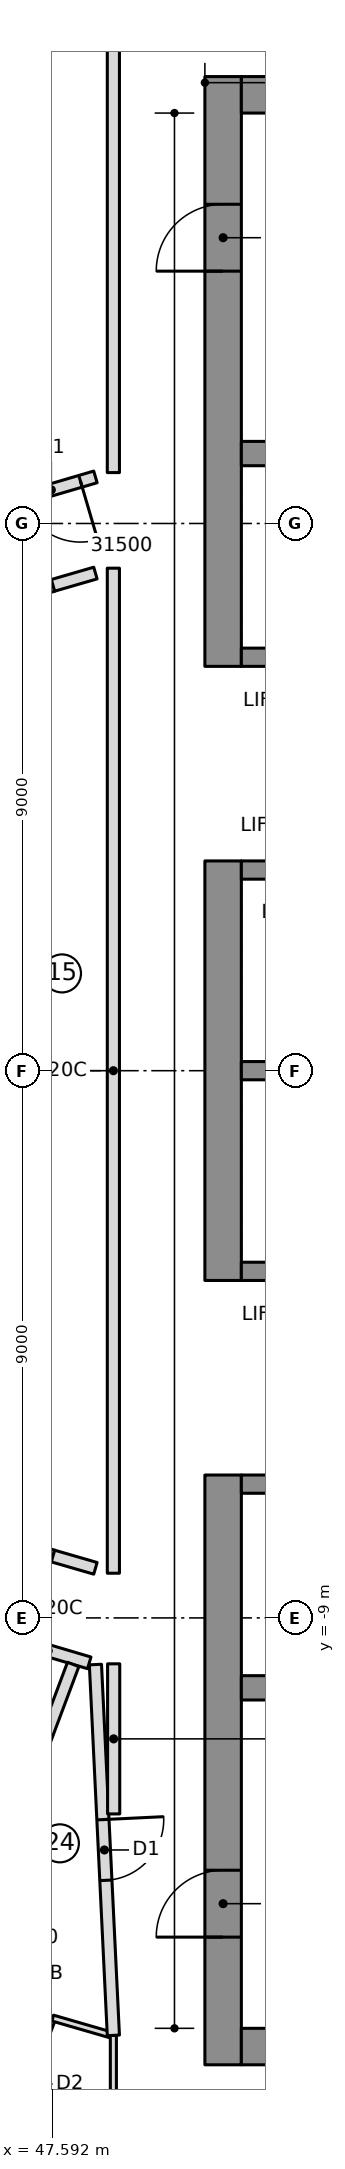
"""IFC4 building model, lengths in metres.
Left out: names, types, materials, properties, quantities, classifications, styles, units other than length and angle.
Written with IfcOpenShell. Run it as: python <this file> out.ifc"""

import sys

from ifc_helpers import new_model, si_unit, direction, frame, frame_2d, origin, place, context, subcontext, project, spatial, rectangle, extrude, element, fill, save


model = new_model("IFC4")
c1 = context("Model", 3, precision=1e-05, world=origin(), true_north=direction((0.0, 1.0)))
c2 = subcontext(c1, "Body", "Model", "MODEL_VIEW")
j1 = project(units=[si_unit("LENGTHUNIT", "METRE"), si_unit("PLANEANGLEUNIT", "RADIAN")], contexts=[c1])
p1 = place(None, origin())
s1 = spatial("IfcSite", under=j1, at=p1, CompositionType="ELEMENT")
p2 = place(p1, origin())
s2 = spatial("IfcBuilding", under=s1, at=p2, CompositionType="ELEMENT")
p3 = place(p2, frame((0.0, 0.0, 252.75)))
s3 = spatial("IfcBuildingStorey", under=s2, at=p3, CompositionType="ELEMENT", Elevation=252.75)
p4 = place(p3, frame((50.4, 6.65, 0.0), z_axis=(0.0, 0.0, 1.0), x_axis=(0.0, 1.0, 0.0)))
e1 = element("IfcWall", 1, at=p4, inside=s3, PredefinedType="SHEAR", context=c2, shape_type="SweptSolid", body=[
    extrude(rectangle(XDim=9.7, YDim=0.6, at=frame_2d((4.85, 0.0))), origin(), (0.0, 0.0, 1.0), 3.55),
])
p5 = place(p4, frame((6.5, 0.0, 0.0)))
e2 = element("IfcOpeningElement", 2, at=p5, cuts=e1, PredefinedType="OPENING", context=c2, shape_type="SweptSolid", body=[
    extrude(rectangle(XDim=1.1, YDim=2.1, at=frame_2d((0.55, 1.05))), frame((0.0, 0.31, 0.0), z_axis=(0.0, -1.0, 0.0), x_axis=(1.0, 0.0, 0.0)), (0.0, 0.0, 1.0), 0.62),
])
p6 = place(p3, frame((50.4, -3.45, 0.0), z_axis=(0.0, 0.0, 1.0), x_axis=(0.0, 1.0, 0.0)))
e3 = element("IfcWall", 3, at=p6, inside=s3, PredefinedType="SHEAR", context=c2, shape_type="SweptSolid", body=[
    extrude(rectangle(XDim=6.9, YDim=0.6, at=frame_2d((3.45, 0.0))), origin(), (0.0, 0.0, 1.0), 3.55),
])
p7 = place(p3, frame((50.4, -16.35, 0.0), z_axis=(0.0, 0.0, 1.0), x_axis=(0.0, 1.0, 0.0)))
e4 = element("IfcWall", 4, at=p7, inside=s3, PredefinedType="SHEAR", context=c2, shape_type="SweptSolid", body=[
    extrude(rectangle(XDim=9.7, YDim=0.6, at=frame_2d((4.85, 0.0))), origin(), (0.0, 0.0, 1.0), 3.55),
])
p8 = place(p7, frame((2.1, 0.0, 0.0)))
e5 = element("IfcOpeningElement", 5, at=p8, cuts=e4, PredefinedType="OPENING", context=c2, shape_type="SweptSolid", body=[
    extrude(rectangle(XDim=1.1, YDim=2.1, at=frame_2d((0.55, 1.05))), frame((0.0, 0.31, 0.0), z_axis=(0.0, -1.0, 0.0), x_axis=(1.0, 0.0, 0.0)), (0.0, 0.0, 1.0), 0.62),
])
for number, where, z_axis, x_axis in (
    (6, (50.7, 16.05, 0.0), (0.0, 0.0, 1.0), (1.0, 0.0, 0.0)),
    (7, (50.7, -16.05, 0.0), (0.0, 0.0, 1.0), (1.0, 0.0, 0.0)),
):
    element("IfcWall", number, at=place(p3, frame(where, z_axis=z_axis, x_axis=x_axis)), inside=s3, PredefinedType="SHEAR", context=c2, shape_type="SweptSolid", body=[
        extrude(rectangle(XDim=13.62, YDim=0.6, at=frame_2d((6.81, 0.0))), origin(), (0.0, 0.0, 1.0), 3.55),
    ])
p9 = place(p3, frame((50.7, 10.15, 0.0), z_axis=(0.0, 0.0, 1.0), x_axis=(1.0, 0.0, 0.0)))
e8 = element("IfcWall", 8, at=p9, inside=s3, PredefinedType="SHEAR", context=c2, shape_type="SweptSolid", body=[
    extrude(rectangle(XDim=13.02, YDim=0.4, at=frame_2d((6.51, 0.0))), origin(), (0.0, 0.0, 1.0), 3.55),
])
p10 = place(p9, frame((0.7, 0.0, 0.0)))
e9 = element("IfcOpeningElement", 9, at=p10, cuts=e8, PredefinedType="OPENING", context=c2, shape_type="SweptSolid", body=[
    extrude(rectangle(XDim=1.1, YDim=2.1, at=frame_2d((0.55, 1.05))), frame((0.0, 0.21, 0.0), z_axis=(0.0, -1.0, 0.0), x_axis=(1.0, 0.0, 0.0)), (0.0, 0.0, 1.0), 0.42),
])
p11 = place(p9, frame((3.5, 0.0, 0.0)))
e10 = element("IfcOpeningElement", 10, at=p11, cuts=e8, PredefinedType="OPENING", context=c2, shape_type="SweptSolid", body=[
    extrude(rectangle(XDim=1.1, YDim=2.1, at=frame_2d((0.55, 1.05))), frame((0.0, 0.21, 0.0), z_axis=(0.0, -1.0, 0.0), x_axis=(1.0, 0.0, 0.0)), (0.0, 0.0, 1.0), 0.42),
])
p12 = place(p3, frame((50.7, -10.15, 0.0), z_axis=(0.0, 0.0, 1.0), x_axis=(1.0, 0.0, 0.0)))
e11 = element("IfcWall", 11, at=p12, inside=s3, PredefinedType="SHEAR", context=c2, shape_type="SweptSolid", body=[
    extrude(rectangle(XDim=13.02, YDim=0.4, at=frame_2d((6.51, 0.0))), origin(), (0.0, 0.0, 1.0), 3.55),
])
p13 = place(p3, frame((50.7, 0.0, 0.0), z_axis=(0.0, 0.0, 1.0), x_axis=(1.0, 0.0, 0.0)))
e12 = element("IfcWall", 12, at=p13, inside=s3, PredefinedType="SHEAR", context=c2, shape_type="SweptSolid", body=[
    extrude(rectangle(XDim=10.9, YDim=0.3, at=frame_2d((5.45, 0.0))), origin(), (0.0, 0.0, 1.0), 3.55),
])
p14 = place(p3, frame((50.7, 3.3, 0.0), z_axis=(0.0, 0.0, 1.0), x_axis=(1.0, 0.0, 0.0)))
e13 = element("IfcWall", 13, at=p14, inside=s3, PredefinedType="SHEAR", context=c2, shape_type="SweptSolid", body=[
    extrude(rectangle(XDim=10.9, YDim=0.3, at=frame_2d((5.45, 0.0))), origin(), (0.0, 0.0, 1.0), 3.55),
])
p15 = place(p14, frame((0.7, 0.0, 0.0)))
e14 = element("IfcOpeningElement", 14, at=p15, cuts=e13, PredefinedType="OPENING", context=c2, shape_type="SweptSolid", body=[
    extrude(rectangle(XDim=1.1, YDim=2.1, at=frame_2d((0.55, 1.05))), frame((0.0, 0.16, 0.0), z_axis=(0.0, -1.0, 0.0), x_axis=(1.0, 0.0, 0.0)), (0.0, 0.0, 1.0), 0.32),
])
p16 = place(p14, frame((3.5, 0.0, 0.0)))
e15 = element("IfcOpeningElement", 15, at=p16, cuts=e13, PredefinedType="OPENING", context=c2, shape_type="SweptSolid", body=[
    extrude(rectangle(XDim=1.1, YDim=2.1, at=frame_2d((0.55, 1.05))), frame((0.0, 0.16, 0.0), z_axis=(0.0, -1.0, 0.0), x_axis=(1.0, 0.0, 0.0)), (0.0, 0.0, 1.0), 0.32),
])
p17 = place(p14, frame((6.4, 0.0, 0.0)))
e16 = element("IfcOpeningElement", 16, at=p17, cuts=e13, PredefinedType="OPENING", context=c2, shape_type="SweptSolid", body=[
    extrude(rectangle(XDim=0.9, YDim=2.1, at=frame_2d((0.45, 1.05))), frame((0.0, 0.16, 0.0), z_axis=(0.0, -1.0, 0.0), x_axis=(1.0, 0.0, 0.0)), (0.0, 0.0, 1.0), 0.32),
])
p18 = place(p14, frame((9.2, 0.0, 0.0)))
e17 = element("IfcOpeningElement", 17, at=p18, cuts=e13, PredefinedType="OPENING", context=c2, shape_type="SweptSolid", body=[
    extrude(rectangle(XDim=0.9, YDim=2.1, at=frame_2d((0.45, 1.05))), frame((0.0, 0.16, 0.0), z_axis=(0.0, -1.0, 0.0), x_axis=(1.0, 0.0, 0.0)), (0.0, 0.0, 1.0), 0.32),
])
p19 = place(p3, frame((50.7, 6.8, 0.0), z_axis=(0.0, 0.0, 1.0), x_axis=(1.0, 0.0, 0.0)))
e18 = element("IfcWall", 18, at=p19, inside=s3, PredefinedType="SHEAR", context=c2, shape_type="SweptSolid", body=[
    extrude(rectangle(XDim=10.9, YDim=0.3, at=frame_2d((5.45, 0.0))), origin(), (0.0, 0.0, 1.0), 3.55),
])
p20 = place(p19, frame((6.4, 0.0, 0.0)))
e19 = element("IfcOpeningElement", 19, at=p20, cuts=e18, PredefinedType="OPENING", context=c2, shape_type="SweptSolid", body=[
    extrude(rectangle(XDim=0.9, YDim=2.1, at=frame_2d((0.45, 1.05))), frame((0.0, 0.16, 0.0), z_axis=(0.0, -1.0, 0.0), x_axis=(1.0, 0.0, 0.0)), (0.0, 0.0, 1.0), 0.32),
])
p21 = place(p19, frame((9.2, 0.0, 0.0)))
e20 = element("IfcOpeningElement", 20, at=p21, cuts=e18, PredefinedType="OPENING", context=c2, shape_type="SweptSolid", body=[
    extrude(rectangle(XDim=0.9, YDim=2.1, at=frame_2d((0.45, 1.05))), frame((0.0, 0.16, 0.0), z_axis=(0.0, -1.0, 0.0), x_axis=(1.0, 0.0, 0.0)), (0.0, 0.0, 1.0), 0.32),
])
p22 = place(p3, frame((50.7, -3.3, 0.0), z_axis=(0.0, 0.0, 1.0), x_axis=(1.0, 0.0, 0.0)))
e21 = element("IfcWall", 21, at=p22, inside=s3, PredefinedType="SHEAR", context=c2, shape_type="SweptSolid", body=[
    extrude(rectangle(XDim=10.9, YDim=0.3, at=frame_2d((5.45, 0.0))), origin(), (0.0, 0.0, 1.0), 3.55),
])
p23 = place(p22, frame((9.1, 0.0, 0.0)))
e22 = element("IfcOpeningElement", 22, at=p23, cuts=e21, PredefinedType="OPENING", context=c2, shape_type="SweptSolid", body=[
    extrude(rectangle(XDim=1.1, YDim=2.1, at=frame_2d((0.55, 1.05))), frame((0.0, 0.16, 0.0), z_axis=(0.0, -1.0, 0.0), x_axis=(1.0, 0.0, 0.0)), (0.0, 0.0, 1.0), 0.32),
])
p24 = place(p3, frame((50.7, -6.8, 0.0), z_axis=(0.0, 0.0, 1.0), x_axis=(1.0, 0.0, 0.0)))
e23 = element("IfcWall", 23, at=p24, inside=s3, PredefinedType="SHEAR", context=c2, shape_type="SweptSolid", body=[
    extrude(rectangle(XDim=10.9, YDim=0.3, at=frame_2d((5.45, 0.0))), origin(), (0.0, 0.0, 1.0), 3.55),
])
p25 = place(p24, frame((6.3, 0.0, 0.0)))
e24 = element("IfcOpeningElement", 24, at=p25, cuts=e23, PredefinedType="OPENING", context=c2, shape_type="SweptSolid", body=[
    extrude(rectangle(XDim=1.1, YDim=2.1, at=frame_2d((0.55, 1.05))), frame((0.0, 0.16, 0.0), z_axis=(0.0, -1.0, 0.0), x_axis=(1.0, 0.0, 0.0)), (0.0, 0.0, 1.0), 0.32),
])
p26 = place(p24, frame((9.1, 0.0, 0.0)))
e25 = element("IfcOpeningElement", 25, at=p26, cuts=e23, PredefinedType="OPENING", context=c2, shape_type="SweptSolid", body=[
    extrude(rectangle(XDim=1.1, YDim=2.1, at=frame_2d((0.55, 1.05))), frame((0.0, 0.16, 0.0), z_axis=(0.0, -1.0, 0.0), x_axis=(1.0, 0.0, 0.0)), (0.0, 0.0, 1.0), 0.32),
])
p27 = place(p24, frame((0.8, 0.0, 0.0)))
e26 = element("IfcOpeningElement", 26, at=p27, cuts=e23, PredefinedType="OPENING", context=c2, shape_type="SweptSolid", body=[
    extrude(rectangle(XDim=0.9, YDim=2.1, at=frame_2d((0.45, 1.05))), frame((0.0, 0.16, 0.0), z_axis=(0.0, -1.0, 0.0), x_axis=(1.0, 0.0, 0.0)), (0.0, 0.0, 1.0), 0.32),
])
p28 = place(p24, frame((3.6, 0.0, 0.0)))
e27 = element("IfcOpeningElement", 27, at=p28, cuts=e23, PredefinedType="OPENING", context=c2, shape_type="SweptSolid", body=[
    extrude(rectangle(XDim=0.9, YDim=2.1, at=frame_2d((0.45, 1.05))), frame((0.0, 0.16, 0.0), z_axis=(0.0, -1.0, 0.0), x_axis=(1.0, 0.0, 0.0)), (0.0, 0.0, 1.0), 0.32),
])
p29 = place(p3, frame((46.85, -9.34, 0.0), z_axis=(0.0, 0.0, 1.0), x_axis=(0.958866391875, -0.283857785753, 0.0)))
e28 = element("IfcWall", 28, at=p29, inside=s3, PredefinedType="PARTITIONING", context=c2, shape_type="SweptSolid", body=[
    extrude(rectangle(XDim=1.406, YDim=0.2, at=frame_2d((0.703, 0.0))), origin(), (0.0, 0.0, 1.0), 3.15),
])
p30 = place(p3, frame((44.56, -18.762, 0.0), z_axis=(0.0, 0.0, 1.0), x_axis=(0.35112901071, 0.936327089129, 0.0)))
e29 = element("IfcWall", 29, at=p30, inside=s3, PredefinedType="PARTITIONING", context=c2, shape_type="SweptSolid", body=[
    extrude(rectangle(XDim=9.608, YDim=0.2, at=frame_2d((4.804, 0.0))), origin(), (0.0, 0.0, 1.0), 3.15),
])
p31 = place(p3, frame((46.788, -17.741, 0.0), z_axis=(0.0, 0.0, 1.0), x_axis=(0.351158236187, 0.936316128857, 0.0)))
e30 = element("IfcWall", 30, at=p31, inside=s3, PredefinedType="PARTITIONING", context=c2, shape_type="SweptSolid", body=[
    extrude(rectangle(XDim=2.307, YDim=0.1, at=frame_2d((1.153, 0.0))), origin(), (0.0, 0.0, 1.0), 3.15),
])
p32 = place(p31, frame((0.75, 0.0, 0.0)))
e31 = element("IfcOpeningElement", 31, at=p32, cuts=e30, PredefinedType="OPENING", context=c2, shape_type="SweptSolid", body=[
    extrude(rectangle(XDim=0.8, YDim=2.1, at=frame_2d((0.4, 1.05))), frame((0.0, 0.06, 0.0), z_axis=(0.0, -1.0, 0.0), x_axis=(1.0, 0.0, 0.0)), (0.0, 0.0, 1.0), 0.12),
])
p33 = place(p3, frame((47.598, -15.582, 0.0), z_axis=(0.0, 0.0, 1.0), x_axis=(0.960468222897, -0.278389642057, 0.0)))
e32 = element("IfcWall", 32, at=p33, inside=s3, PredefinedType="PARTITIONING", context=c2, shape_type="SweptSolid", body=[
    extrude(rectangle(XDim=1.019, YDim=0.1, at=frame_2d((0.51, 0.0))), origin(), (0.0, 0.0, 1.0), 3.15),
])
for number, where, z_axis, x_axis in (
    (33, (46.85, 7.748, 0.0), (0.0, 0.0, 1.0), (0.955, 0.298, 0.0)),
    (34, (47.602, -7.982, 0.0), (0.0, 0.0, 1.0), (-0.955, 0.298, 0.0)),
):
    element("IfcWall", number, at=place(p3, frame(where, z_axis=z_axis, x_axis=x_axis)), inside=s3, PredefinedType="PARTITIONING", context=c2, shape_type="SweptSolid", body=[
        extrude(rectangle(XDim=0.788, YDim=0.2, at=frame_2d((0.394, 0.0))), origin(), (0.0, 0.0, 1.0), 3.15),
    ])
p34 = place(p3, frame((48.595, -15.866, 0.0), z_axis=(0.0, 0.0, 1.0), x_axis=(0.0, -1.0, 0.0)))
e35 = element("IfcWall", 35, at=p34, inside=s3, PredefinedType="PARTITIONING", context=c2, shape_type="SweptSolid", body=[
    extrude(rectangle(XDim=2.431, YDim=0.1, at=frame_2d((1.215, 0.0))), origin(), (0.0, 0.0, 1.0), 3.15),
])
p35 = place(p3, frame((48.3, 9.766, 0.0), z_axis=(0.0, 0.0, 1.0), x_axis=(-0.95944263903, -0.281903924079, 0.0)))
e36 = element("IfcWall", 36, at=p35, inside=s3, PredefinedType="PARTITIONING", context=c2, shape_type="SweptSolid", body=[
    extrude(rectangle(XDim=1.511, YDim=0.2, at=frame_2d((0.756, 0.0))), origin(), (0.0, 0.0, 1.0), 3.15),
])
p36 = place(p35, frame((0.256, 0.0, 0.0)))
e37 = element("IfcOpeningElement", 37, at=p36, cuts=e36, PredefinedType="OPENING", context=c2, shape_type="SweptSolid", body=[
    extrude(rectangle(XDim=1.0, YDim=2.1, at=frame_2d((0.5, 1.05))), frame((0.0, 0.11, 0.0), z_axis=(0.0, -1.0, 0.0), x_axis=(1.0, 0.0, 0.0)), (0.0, 0.0, 1.0), 0.22),
])
for number, where, z_axis, x_axis in (
    (38, (47.602, 7.982, 0.0), (0.0, 0.0, 1.0), (0.96, 0.278, 0.0)),
    (39, (48.3, -8.185, 0.0), (0.0, 0.0, 1.0), (-0.96, 0.278, 0.0)),
):
    element("IfcWall", number, at=place(p3, frame(where, z_axis=z_axis, x_axis=x_axis)), inside=s3, PredefinedType="PARTITIONING", context=c2, shape_type="SweptSolid", body=[
        extrude(rectangle(XDim=0.727, YDim=0.2, at=frame_2d((0.363, 0.0))), origin(), (0.0, 0.0, 1.0), 3.15),
    ])
p37 = place(p3, frame((48.3, -9.767, 0.0), z_axis=(0.0, 0.0, 1.0), x_axis=(0.048302241024, -0.998832765538, 0.0)))
e40 = element("IfcWall", 40, at=p37, inside=s3, PredefinedType="PARTITIONING", context=c2, shape_type="SweptSolid", body=[
    extrude(rectangle(XDim=6.106, YDim=0.2, at=frame_2d((3.053, 0.0))), origin(), (0.0, 0.0, 1.0), 3.15),
])
p38 = place(p37, frame((2.553, 0.0, 0.0)))
e41 = element("IfcOpeningElement", 41, at=p38, cuts=e40, PredefinedType="OPENING", context=c2, shape_type="SweptSolid", body=[
    extrude(rectangle(XDim=1.0, YDim=2.1, at=frame_2d((0.5, 1.05))), frame((0.0, 0.11, 0.0), z_axis=(0.0, -1.0, 0.0), x_axis=(1.0, 0.0, 0.0)), (0.0, 0.0, 1.0), 0.22),
])
p39 = place(p3, frame((48.595, 8.265, 0.0), z_axis=(0.0, 0.0, 1.0), x_axis=(0.0, -1.0, 0.0)))
e42 = element("IfcWall", 42, at=p39, inside=s3, PredefinedType="PARTITIONING", context=c2, shape_type="SweptSolid", body=[
    extrude(rectangle(XDim=16.53, YDim=0.2, at=frame_2d((8.265, 0.0))), origin(), (0.0, 0.0, 1.0), 3.15),
])
p40 = place(p3, frame((48.595, 19.929, 0.0), z_axis=(0.0, 0.0, 1.0), x_axis=(0.0, -1.0, 0.0)))
e43 = element("IfcWall", 43, at=p40, inside=s3, PredefinedType="PARTITIONING", context=c2, shape_type="SweptSolid", body=[
    extrude(rectangle(XDim=10.093, YDim=0.2, at=frame_2d((5.046, 0.0))), origin(), (0.0, 0.0, 1.0), 3.15),
])
p41 = place(p3, frame((48.6, -12.224, 0.0), z_axis=(0.0, 0.0, 1.0), x_axis=(0.0, 1.0, 0.0)))
e44 = element("IfcWall", 44, at=p41, inside=s3, PredefinedType="PARTITIONING", context=c2, shape_type="SweptSolid", body=[
    extrude(rectangle(XDim=2.469, YDim=0.2, at=frame_2d((1.234, 0.0))), origin(), (0.0, 0.0, 1.0), 3.15),
])
p42 = place(p36, origin())
e45 = element("IfcDoor", 45, at=p42, inside=s3, OperationType="SINGLE_SWING_LEFT", PredefinedType="DOOR", context=c2, shape_type="SweptSolid", body=[
    extrude(rectangle(XDim=1.0, YDim=2.1, at=frame_2d((0.5, 1.05))), frame((0.0, 0.025, 0.0), z_axis=(0.0, -1.0, 0.0), x_axis=(1.0, 0.0, 0.0)), (0.0, 0.0, 1.0), 0.05),
])
fill(e37, e45)
p43 = place(p38, origin())
e46 = element("IfcDoor", 46, at=p43, inside=s3, OperationType="SINGLE_SWING_LEFT", PredefinedType="DOOR", context=c2, shape_type="SweptSolid", body=[
    extrude(rectangle(XDim=1.0, YDim=2.1, at=frame_2d((0.5, 1.05))), frame((0.0, 0.025, 0.0), z_axis=(0.0, -1.0, 0.0), x_axis=(1.0, 0.0, 0.0)), (0.0, 0.0, 1.0), 0.05),
])
fill(e41, e46)
p44 = place(p5, origin())
e47 = element("IfcDoor", 47, at=p44, inside=s3, OperationType="SINGLE_SWING_RIGHT", PredefinedType="DOOR", context=c2, shape_type="SweptSolid", body=[
    extrude(rectangle(XDim=1.1, YDim=2.1, at=frame_2d((0.55, 1.05))), frame((0.0, 0.025, 0.0), z_axis=(0.0, -1.0, 0.0), x_axis=(1.0, 0.0, 0.0)), (0.0, 0.0, 1.0), 0.05),
])
fill(e2, e47)
p45 = place(p8, origin())
e48 = element("IfcDoor", 48, at=p45, inside=s3, OperationType="SINGLE_SWING_RIGHT", PredefinedType="DOOR", context=c2, shape_type="SweptSolid", body=[
    extrude(rectangle(XDim=1.1, YDim=2.1, at=frame_2d((0.55, 1.05))), frame((0.0, 0.025, 0.0), z_axis=(0.0, -1.0, 0.0), x_axis=(1.0, 0.0, 0.0)), (0.0, 0.0, 1.0), 0.05),
])
fill(e5, e48)
save(model, sys.argv[1])
